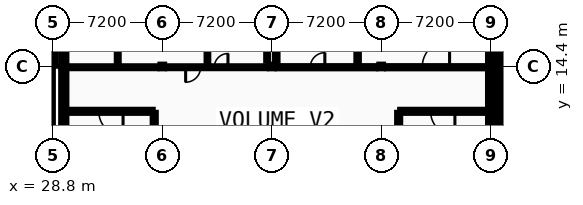
"""IFC4 building model, lengths in metres.
Left out: names, types, materials, properties, quantities, classifications, styles, units other than length and angle.
Written with IfcOpenShell. Run it as: python <this file> out.ifc"""

import sys

from ifc_helpers import new_model, si_unit, direction, frame, frame_2d, origin, origin_2d, place, context, subcontext, project, spatial, rectangle, i_section, extrude, element, fill, save


model = new_model("IFC4")
c1 = context("Model", 3, precision=1e-05, world=origin(), true_north=direction((0.0, 1.0)))
c2 = subcontext(c1, "Body", "Model", "MODEL_VIEW")
j1 = project(units=[si_unit("LENGTHUNIT", "METRE"), si_unit("PLANEANGLEUNIT", "RADIAN")], contexts=[c1])
p1 = place(None, origin())
s1 = spatial("IfcSite", under=j1, at=p1, CompositionType="ELEMENT")
p2 = place(p1, origin())
s2 = spatial("IfcBuilding", under=s1, at=p2, CompositionType="ELEMENT")
p3 = place(p2, frame((0.0, 0.0, 18.4)))
s3 = spatial("IfcBuildingStorey", under=s2, at=p3, CompositionType="ELEMENT", Elevation=18.4)
for number, where, z_axis, x_axis in (
    (1, (29.52, 14.4, 0.0), (0.0, 0.0, 1.0), (1.0, 0.0, 0.0)),
    (2, (36.0, 14.4, 0.0), (0.0, 0.0, 1.0), (1.0, 0.0, 0.0)),
    (3, (43.2, 14.4, 0.0), (0.0, 0.0, 1.0), (1.0, 0.0, 0.0)),
    (4, (50.4, 14.4, 0.0), (0.0, 0.0, 1.0), (1.0, 0.0, 0.0)),
    (5, (57.6, 14.4, 0.0), (0.0, 0.0, 1.0), (1.0, 0.0, 0.0)),
    (6, (58.32, 14.4, 0.0), (0.0, 0.0, 1.0), (1.0, 0.0, 0.0)),
):
    element("IfcColumn", number, at=place(p3, frame(where, z_axis=z_axis, x_axis=x_axis)), inside=s3, PredefinedType="COLUMN", context=c2, shape_type="SweptSolid", body=[
        extrude(i_section(OverallWidth=0.24, OverallDepth=0.24, WebThickness=0.01, FlangeThickness=0.017, FilletRadius=0.021, at=origin_2d()), origin(), (0.0, 0.0, 1.0), 4.4),
    ])
p4 = place(p3, frame((28.8, 14.45, 0.0), z_axis=(0.0, 0.0, 1.0), x_axis=(0.0, 1.0, 0.0)))
e7 = element("IfcWall", 7, at=p4, inside=s3, PredefinedType="STANDARD", context=c2, shape_type="SweptSolid", body=[
    extrude(rectangle(XDim=7.15, YDim=0.34, at=frame_2d((3.575, 0.0))), origin(), (0.0, 0.0, 1.0), 4.215),
])
p5 = place(p4, frame((1.579, 0.0, 0.95)))
e8 = element("IfcOpeningElement", 8, at=p5, cuts=e7, PredefinedType="OPENING", context=c2, shape_type="SweptSolid", body=[
    extrude(rectangle(XDim=1.132, YDim=1.404, at=frame_2d((0.566, 0.702))), frame((0.0, 0.18, 0.0), z_axis=(0.0, -1.0, 0.0), x_axis=(1.0, 0.0, 0.0)), (0.0, 0.0, 1.0), 0.36),
])
p6 = place(p4, frame((4.439, 0.0, 0.95)))
e9 = element("IfcOpeningElement", 9, at=p6, cuts=e7, PredefinedType="OPENING", context=c2, shape_type="SweptSolid", body=[
    extrude(rectangle(XDim=1.132, YDim=1.404, at=frame_2d((0.566, 0.702))), frame((0.0, 0.18, 0.0), z_axis=(0.0, -1.0, 0.0), x_axis=(1.0, 0.0, 0.0)), (0.0, 0.0, 1.0), 0.36),
])
p7 = place(p3, frame((29.52, 14.4, 0.0), z_axis=(0.0, 0.0, 1.0), x_axis=(0.0, -1.0, 0.0)))
e10 = element("IfcWall", 10, at=p7, inside=s3, PredefinedType="STANDARD", context=c2, shape_type="SweptSolid", body=[
    extrude(rectangle(XDim=5.5, YDim=0.34, at=frame_2d((2.75, 0.0))), origin(), (0.0, 0.0, 1.0), 4.11),
])
p8 = place(p3, frame((29.52, 21.77, 0.0), z_axis=(0.0, 0.0, 1.0), x_axis=(0.0, -1.0, 0.0)))
e11 = element("IfcWall", 11, at=p8, inside=s3, PredefinedType="STANDARD", context=c2, shape_type="SweptSolid", body=[
    extrude(rectangle(XDim=7.37, YDim=0.34, at=frame_2d((3.685, 0.0))), origin(), (0.0, 0.0, 1.0), 4.11),
])
p9 = place(p8, frame((1.577, 0.0, 0.95)))
e12 = element("IfcOpeningElement", 12, at=p9, cuts=e11, PredefinedType="OPENING", context=c2, shape_type="SweptSolid", body=[
    extrude(rectangle(XDim=1.268, YDim=1.404, at=frame_2d((0.634, 0.702))), frame((0.0, 0.18, 0.0), z_axis=(0.0, -1.0, 0.0), x_axis=(1.0, 0.0, 0.0)), (0.0, 0.0, 1.0), 0.36),
])
p10 = place(p8, frame((4.525, 0.0, 0.95)))
e13 = element("IfcOpeningElement", 13, at=p10, cuts=e11, PredefinedType="OPENING", context=c2, shape_type="SweptSolid", body=[
    extrude(rectangle(XDim=1.268, YDim=1.404, at=frame_2d((0.634, 0.702))), frame((0.0, 0.18, 0.0), z_axis=(0.0, -1.0, 0.0), x_axis=(1.0, 0.0, 0.0)), (0.0, 0.0, 1.0), 0.36),
])
p11 = place(p3, frame((57.6, 8.9, 0.0), z_axis=(0.0, 0.0, 1.0), x_axis=(0.0, 1.0, 0.0)))
e14 = element("IfcWall", 14, at=p11, inside=s3, PredefinedType="STANDARD", context=c2, shape_type="SweptSolid", body=[
    extrude(rectangle(XDim=5.5, YDim=0.34, at=frame_2d((2.75, 0.0))), origin(), (0.0, 0.0, 1.0), 4.11),
])
p12 = place(p3, frame((57.6, 14.4, 0.0), z_axis=(0.0, 0.0, 1.0), x_axis=(0.0, 1.0, 0.0)))
e15 = element("IfcWall", 15, at=p12, inside=s3, PredefinedType="STANDARD", context=c2, shape_type="SweptSolid", body=[
    extrude(rectangle(XDim=7.37, YDim=0.34, at=frame_2d((3.685, 0.0))), origin(), (0.0, 0.0, 1.0), 4.11),
])
p13 = place(p12, frame((1.311, 0.0, 0.95)))
e16 = element("IfcOpeningElement", 16, at=p13, cuts=e15, PredefinedType="OPENING", context=c2, shape_type="SweptSolid", body=[
    extrude(rectangle(XDim=1.8, YDim=1.85, at=frame_2d((0.9, 0.925))), frame((0.0, 0.18, 0.0), z_axis=(0.0, -1.0, 0.0), x_axis=(1.0, 0.0, 0.0)), (0.0, 0.0, 1.0), 0.36),
])
p14 = place(p12, frame((4.259, 0.0, 0.95)))
e17 = element("IfcOpeningElement", 17, at=p14, cuts=e15, PredefinedType="OPENING", context=c2, shape_type="SweptSolid", body=[
    extrude(rectangle(XDim=1.8, YDim=1.85, at=frame_2d((0.9, 0.925))), frame((0.0, 0.18, 0.0), z_axis=(0.0, -1.0, 0.0), x_axis=(1.0, 0.0, 0.0)), (0.0, 0.0, 1.0), 0.36),
])
p15 = place(p3, frame((58.32, 14.4, 0.0), z_axis=(0.0, 0.0, 1.0), x_axis=(0.0, -1.0, 0.0)))
e18 = element("IfcWall", 18, at=p15, inside=s3, PredefinedType="STANDARD", context=c2, shape_type="SweptSolid", body=[
    extrude(rectangle(XDim=5.5, YDim=0.34, at=frame_2d((2.75, 0.0))), origin(), (0.0, 0.0, 1.0), 4.11),
])
p16 = place(p3, frame((58.32, 21.77, 0.0), z_axis=(0.0, 0.0, 1.0), x_axis=(0.0, -1.0, 0.0)))
e19 = element("IfcWall", 19, at=p16, inside=s3, PredefinedType="STANDARD", context=c2, shape_type="SweptSolid", body=[
    extrude(rectangle(XDim=7.37, YDim=0.34, at=frame_2d((3.685, 0.0))), origin(), (0.0, 0.0, 1.0), 4.11),
])
p17 = place(p16, frame((1.594, 0.0, 0.95)))
e20 = element("IfcOpeningElement", 20, at=p17, cuts=e19, PredefinedType="OPENING", context=c2, shape_type="SweptSolid", body=[
    extrude(rectangle(XDim=1.234, YDim=1.368, at=frame_2d((0.617, 0.684))), frame((0.0, 0.18, 0.0), z_axis=(0.0, -1.0, 0.0), x_axis=(1.0, 0.0, 0.0)), (0.0, 0.0, 1.0), 0.36),
])
p18 = place(p16, frame((4.542, 0.0, 0.95)))
e21 = element("IfcOpeningElement", 21, at=p18, cuts=e19, PredefinedType="OPENING", context=c2, shape_type="SweptSolid", body=[
    extrude(rectangle(XDim=1.234, YDim=1.368, at=frame_2d((0.617, 0.684))), frame((0.0, 0.18, 0.0), z_axis=(0.0, -1.0, 0.0), x_axis=(1.0, 0.0, 0.0)), (0.0, 0.0, 1.0), 0.36),
])
p19 = place(p3, frame((58.32, 0.2, 4.4), z_axis=(0.0, 0.0, 1.0), x_axis=(0.0, 1.0, 0.0)))
e22 = element("IfcWall", 22, at=p19, inside=s3, PredefinedType="PARAPET", context=c2, shape_type="SweptSolid", body=[
    extrude(rectangle(XDim=21.2, YDim=0.2, at=frame_2d((10.6, 0.0))), origin(), (0.0, 0.0, 1.0), 0.55),
])
p20 = place(p3, frame((28.6, 5.85, 0.0), z_axis=(0.0, 0.0, 1.0), x_axis=(0.0, 1.0, 0.0)))
e23 = element("IfcWall", 23, at=p20, inside=s3, PredefinedType="SHEAR", context=c2, shape_type="SweptSolid", body=[
    extrude(rectangle(XDim=8.6, YDim=0.4, at=frame_2d((4.3, 0.0))), origin(), (0.0, 0.0, 1.0), 4.215),
])
p21 = place(p3, frame((29.87, 11.45, 0.0), z_axis=(0.0, 0.0, 1.0), x_axis=(1.0, 0.0, 0.0)))
e24 = element("IfcWall", 24, at=p21, inside=s3, PredefinedType="PARTITIONING", context=c2, shape_type="SweptSolid", body=[
    extrude(rectangle(XDim=5.5, YDim=0.2, at=frame_2d((2.75, 0.0))), origin(), (0.0, 0.0, 1.0), 4.18),
])
p22 = place(p21, frame((1.95, 0.0, 0.0)))
e25 = element("IfcOpeningElement", 25, at=p22, cuts=e24, PredefinedType="OPENING", context=c2, shape_type="SweptSolid", body=[
    extrude(rectangle(XDim=1.6, YDim=2.2, at=frame_2d((0.8, 1.1))), frame((0.0, 0.11, 0.0), z_axis=(0.0, -1.0, 0.0), x_axis=(1.0, 0.0, 0.0)), (0.0, 0.0, 1.0), 0.22),
])
p23 = place(p3, frame((35.47, 8.9, 0.0), z_axis=(0.0, 0.0, 1.0), x_axis=(0.0, 1.0, 0.0)))
e26 = element("IfcWall", 26, at=p23, inside=s3, PredefinedType="PARTITIONING", context=c2, shape_type="SweptSolid", body=[
    extrude(rectangle(XDim=2.45, YDim=0.2, at=frame_2d((1.225, 0.0))), origin(), (0.0, 0.0, 1.0), 4.18),
])
p24 = place(p3, frame((51.65, 11.45, 0.0), z_axis=(0.0, 0.0, 1.0), x_axis=(1.0, 0.0, 0.0)))
e27 = element("IfcWall", 27, at=p24, inside=s3, PredefinedType="PARTITIONING", context=c2, shape_type="SweptSolid", body=[
    extrude(rectangle(XDim=5.6, YDim=0.2, at=frame_2d((2.8, 0.0))), origin(), (0.0, 0.0, 1.0), 4.18),
])
p25 = place(p24, frame((2.0, 0.0, 0.0)))
e28 = element("IfcOpeningElement", 28, at=p25, cuts=e27, PredefinedType="OPENING", context=c2, shape_type="SweptSolid", body=[
    extrude(rectangle(XDim=1.6, YDim=2.2, at=frame_2d((0.8, 1.1))), frame((0.0, 0.11, 0.0), z_axis=(0.0, -1.0, 0.0), x_axis=(1.0, 0.0, 0.0)), (0.0, 0.0, 1.0), 0.22),
])
p26 = place(p3, frame((51.55, 8.9, 0.0), z_axis=(0.0, 0.0, 1.0), x_axis=(0.0, 1.0, 0.0)))
e29 = element("IfcWall", 29, at=p26, inside=s3, PredefinedType="PARTITIONING", context=c2, shape_type="SweptSolid", body=[
    extrude(rectangle(XDim=2.45, YDim=0.2, at=frame_2d((1.225, 0.0))), origin(), (0.0, 0.0, 1.0), 4.18),
])
p27 = place(p3, frame((29.9, 14.35, 0.0), z_axis=(0.0, 0.0, 1.0), x_axis=(1.0, 0.0, 0.0)))
e30 = element("IfcWall", 30, at=p27, inside=s3, PredefinedType="PARTITIONING", context=c2, shape_type="SweptSolid", body=[
    extrude(rectangle(XDim=5.72, YDim=0.125, at=frame_2d((2.86, 0.0))), origin(), (0.0, 0.0, 1.0), 4.035),
])
p28 = place(p27, frame((1.72, 0.0, 0.0)))
e31 = element("IfcOpeningElement", 31, at=p28, cuts=e30, PredefinedType="OPENING", context=c2, shape_type="SweptSolid", body=[
    extrude(rectangle(XDim=1.0, YDim=2.1, at=frame_2d((0.5, 1.05))), frame((0.0, 0.073, 0.0), z_axis=(0.0, -1.0, 0.0), x_axis=(1.0, 0.0, 0.0)), (0.0, 0.0, 1.0), 0.145),
])
p29 = place(p3, frame((36.38, 14.35, 0.0), z_axis=(0.0, 0.0, 1.0), x_axis=(1.0, 0.0, 0.0)))
e32 = element("IfcWall", 32, at=p29, inside=s3, PredefinedType="PARTITIONING", context=c2, shape_type="SweptSolid", body=[
    extrude(rectangle(XDim=6.44, YDim=0.125, at=frame_2d((3.22, 0.0))), origin(), (0.0, 0.0, 1.0), 4.035),
])
p30 = place(p29, frame((3.04, 0.0, 0.0)))
e33 = element("IfcOpeningElement", 33, at=p30, cuts=e32, PredefinedType="OPENING", context=c2, shape_type="SweptSolid", body=[
    extrude(rectangle(XDim=0.9, YDim=2.1, at=frame_2d((0.45, 1.05))), frame((0.0, 0.073, 0.0), z_axis=(0.0, -1.0, 0.0), x_axis=(1.0, 0.0, 0.0)), (0.0, 0.0, 1.0), 0.145),
])
p31 = place(p29, frame((1.156, 0.0, 0.0)))
e34 = element("IfcOpeningElement", 34, at=p31, cuts=e32, PredefinedType="OPENING", context=c2, shape_type="SweptSolid", body=[
    extrude(rectangle(XDim=0.984, YDim=2.068, at=frame_2d((0.492, 1.034))), frame((0.0, 0.073, 0.0), z_axis=(0.0, -1.0, 0.0), x_axis=(1.0, 0.0, 0.0)), (0.0, 0.0, 1.0), 0.145),
])
p32 = place(p3, frame((43.58, 14.35, 0.0), z_axis=(0.0, 0.0, 1.0), x_axis=(1.0, 0.0, 0.0)))
e35 = element("IfcWall", 35, at=p32, inside=s3, PredefinedType="PARTITIONING", context=c2, shape_type="SweptSolid", body=[
    extrude(rectangle(XDim=6.44, YDim=0.142, at=frame_2d((3.22, 0.0))), origin(), (0.0, 0.0, 1.0), 4.035),
])
p33 = place(p32, frame((2.156, 0.0, 0.0)))
e36 = element("IfcOpeningElement", 36, at=p33, cuts=e35, PredefinedType="OPENING", context=c2, shape_type="SweptSolid", body=[
    extrude(rectangle(XDim=0.958, YDim=2.068, at=frame_2d((0.479, 1.034))), frame((0.0, 0.081, 0.0), z_axis=(0.0, -1.0, 0.0), x_axis=(1.0, 0.0, 0.0)), (0.0, 0.0, 1.0), 0.162),
])
p34 = place(p3, frame((50.78, 14.35, 0.0), z_axis=(0.0, 0.0, 1.0), x_axis=(1.0, 0.0, 0.0)))
e37 = element("IfcWall", 37, at=p34, inside=s3, PredefinedType="PARTITIONING", context=c2, shape_type="SweptSolid", body=[
    extrude(rectangle(XDim=6.44, YDim=0.142, at=frame_2d((3.22, 0.0))), origin(), (0.0, 0.0, 1.0), 4.035),
])
p35 = place(p34, frame((2.32, 0.0, 0.0)))
e38 = element("IfcOpeningElement", 38, at=p35, cuts=e37, PredefinedType="OPENING", context=c2, shape_type="SweptSolid", body=[
    extrude(rectangle(XDim=1.8, YDim=2.3, at=frame_2d((0.9, 1.15))), frame((0.0, 0.081, 0.0), z_axis=(0.0, -1.0, 0.0), x_axis=(1.0, 0.0, 0.0)), (0.0, 0.0, 1.0), 0.162),
])
p36 = place(p3, frame((33.07, 14.413, 0.0), z_axis=(0.0, 0.0, 1.0), x_axis=(0.0, 1.0, 0.0)))
e39 = element("IfcWall", 39, at=p36, inside=s3, PredefinedType="PARTITIONING", context=c2, shape_type="SweptSolid", body=[
    extrude(rectangle(XDim=6.987, YDim=0.125, at=frame_2d((3.494, 0.0))), origin(), (0.0, 0.0, 1.0), 4.18),
])
p37 = place(p3, frame((38.97, 14.413, 0.0), z_axis=(0.0, 0.0, 1.0), x_axis=(0.0, 1.0, 0.0)))
e40 = element("IfcWall", 40, at=p37, inside=s3, PredefinedType="PARTITIONING", context=c2, shape_type="SweptSolid", body=[
    extrude(rectangle(XDim=6.932, YDim=0.11, at=frame_2d((3.466, 0.0))), origin(), (0.0, 0.0, 1.0), 4.18),
])
p38 = place(p3, frame((42.9, 14.78, 0.0), z_axis=(0.0, 0.0, 1.0), x_axis=(0.0, 1.0, 0.0)))
e41 = element("IfcWall", 41, at=p38, inside=s3, PredefinedType="PARTITIONING", context=c2, shape_type="SweptSolid", body=[
    extrude(rectangle(XDim=6.44, YDim=0.125, at=frame_2d((3.22, 0.0))), origin(), (0.0, 0.0, 1.0), 4.18),
])
p39 = place(p3, frame((43.5, 14.78, 0.0), z_axis=(0.0, 0.0, 1.0), x_axis=(0.0, 1.0, 0.0)))
e42 = element("IfcWall", 42, at=p39, inside=s3, PredefinedType="PARTITIONING", context=c2, shape_type="SweptSolid", body=[
    extrude(rectangle(XDim=6.44, YDim=0.16, at=frame_2d((3.22, 0.0))), origin(), (0.0, 0.0, 1.0), 4.18),
])
p40 = place(p3, frame((48.85, 14.421, 0.0), z_axis=(0.0, 0.0, 1.0), x_axis=(0.0, 1.0, 0.0)))
e43 = element("IfcWall", 43, at=p40, inside=s3, PredefinedType="PARTITIONING", context=c2, shape_type="SweptSolid", body=[
    extrude(rectangle(XDim=6.912, YDim=0.16, at=frame_2d((3.456, 0.0))), origin(), (0.0, 0.0, 1.0), 4.18),
])
p41 = place(p22, origin())
e44 = element("IfcDoor", 44, at=p41, inside=s3, OperationType="DOUBLE_DOOR_SINGLE_SWING", PredefinedType="DOOR", context=c2, shape_type="SweptSolid", body=[
    extrude(rectangle(XDim=1.6, YDim=2.2, at=frame_2d((0.8, 1.1))), frame((0.0, 0.025, 0.0), z_axis=(0.0, -1.0, 0.0), x_axis=(1.0, 0.0, 0.0)), (0.0, 0.0, 1.0), 0.05),
])
fill(e25, e44)
p42 = place(p25, origin())
e45 = element("IfcDoor", 45, at=p42, inside=s3, OperationType="DOUBLE_DOOR_SINGLE_SWING", PredefinedType="DOOR", context=c2, shape_type="SweptSolid", body=[
    extrude(rectangle(XDim=1.6, YDim=2.2, at=frame_2d((0.8, 1.1))), frame((0.0, 0.025, 0.0), z_axis=(0.0, -1.0, 0.0), x_axis=(1.0, 0.0, 0.0)), (0.0, 0.0, 1.0), 0.05),
])
fill(e28, e45)
p43 = place(p28, frame((1.0, 0.0, 0.0), z_axis=(0.0, 0.0, 1.0), x_axis=(-1.0, 0.0, 0.0)))
e46 = element("IfcDoor", 46, at=p43, inside=s3, OperationType="SLIDING_TO_LEFT", PredefinedType="DOOR", context=c2, shape_type="SweptSolid", body=[
    extrude(rectangle(XDim=1.0, YDim=2.1, at=frame_2d((0.5, 1.05))), frame((0.0, 0.025, 0.0), z_axis=(0.0, -1.0, 0.0), x_axis=(1.0, 0.0, 0.0)), (0.0, 0.0, 1.0), 0.05),
])
fill(e31, e46)
p44 = place(p30, frame((0.9, 0.0, 0.0), z_axis=(0.0, 0.0, 1.0), x_axis=(-1.0, 0.0, 0.0)))
e47 = element("IfcDoor", 47, at=p44, inside=s3, OperationType="SINGLE_SWING_RIGHT", PredefinedType="DOOR", context=c2, shape_type="SweptSolid", body=[
    extrude(rectangle(XDim=0.9, YDim=2.1, at=frame_2d((0.45, 1.05))), frame((0.0, 0.025, 0.0), z_axis=(0.0, -1.0, 0.0), x_axis=(1.0, 0.0, 0.0)), (0.0, 0.0, 1.0), 0.05),
])
fill(e33, e47)
p45 = place(p33, frame((0.958, 0.0, 0.0), z_axis=(0.0, 0.0, 1.0), x_axis=(-1.0, 0.0, 0.0)))
e48 = element("IfcDoor", 48, at=p45, inside=s3, OperationType="SINGLE_SWING_RIGHT", PredefinedType="DOOR", context=c2, shape_type="SweptSolid", body=[
    extrude(rectangle(XDim=0.958, YDim=2.068, at=frame_2d((0.479, 1.034))), frame((0.0, 0.025, 0.0), z_axis=(0.0, -1.0, 0.0), x_axis=(1.0, 0.0, 0.0)), (0.0, 0.0, 1.0), 0.05),
])
fill(e36, e48)
p46 = place(p31, frame((0.984, 0.0, 0.0), z_axis=(0.0, 0.0, 1.0), x_axis=(-1.0, 0.0, 0.0)))
e49 = element("IfcDoor", 49, at=p46, inside=s3, OperationType="SINGLE_SWING_LEFT", PredefinedType="DOOR", context=c2, shape_type="SweptSolid", body=[
    extrude(rectangle(XDim=0.984, YDim=2.068, at=frame_2d((0.492, 1.034))), frame((0.0, 0.025, 0.0), z_axis=(0.0, -1.0, 0.0), x_axis=(1.0, 0.0, 0.0)), (0.0, 0.0, 1.0), 0.05),
])
fill(e34, e49)
p47 = place(p35, frame((1.8, 0.0, 0.0), z_axis=(0.0, 0.0, 1.0), x_axis=(-1.0, 0.0, 0.0)))
e50 = element("IfcDoor", 50, at=p47, inside=s3, OperationType="DOUBLE_DOOR_SINGLE_SWING", PredefinedType="DOOR", context=c2, shape_type="SweptSolid", body=[
    extrude(rectangle(XDim=1.8, YDim=2.3, at=frame_2d((0.9, 1.15))), frame((0.0, 0.025, 0.0), z_axis=(0.0, -1.0, 0.0), x_axis=(1.0, 0.0, 0.0)), (0.0, 0.0, 1.0), 0.05),
])
fill(e38, e50)
save(model, sys.argv[1])
